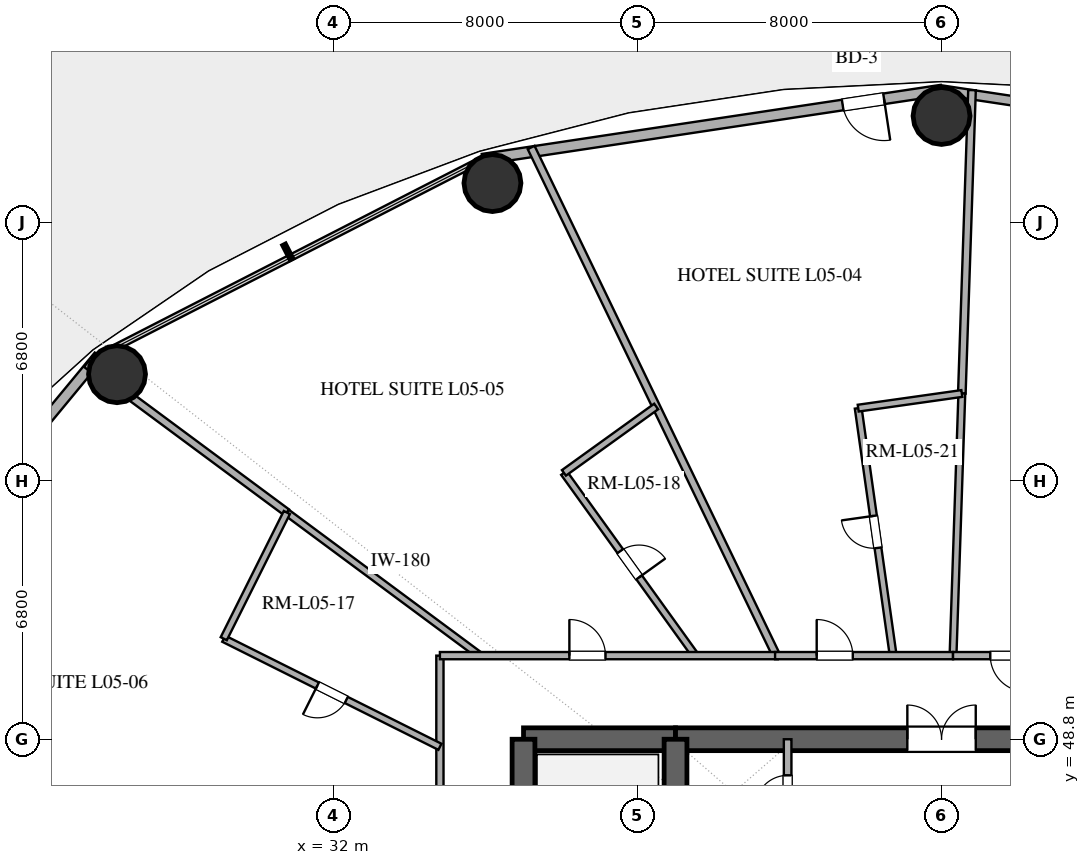
"""IFC4 building model, lengths in metres.
Left out: names, types, materials, properties, quantities, classifications, styles, units other than length and angle.
Written with IfcOpenShell. Run it as: python <this file> out.ifc"""

import sys

from ifc_helpers import new_model, si_unit, direction, frame, frame_2d, origin, origin_2d, place, context, subcontext, project, spatial, rectangle, hollow_circle, extrude, element, fill, save


model = new_model("IFC4")
c1 = context("Model", 3, precision=1e-05, world=origin(), true_north=direction((0.0, 1.0)))
c2 = subcontext(c1, "Body", "Model", "MODEL_VIEW")
j1 = project(units=[si_unit("LENGTHUNIT", "METRE"), si_unit("PLANEANGLEUNIT", "RADIAN")], contexts=[c1])
p1 = place(None, origin())
s1 = spatial("IfcSite", under=j1, at=p1, CompositionType="ELEMENT")
p2 = place(p1, origin())
s2 = spatial("IfcBuilding", under=s1, at=p2, CompositionType="ELEMENT")
p3 = place(p2, frame((0.0, 0.0, 28.2)))
s3 = spatial("IfcBuildingStorey", under=s2, at=p3, CompositionType="ELEMENT", Elevation=28.2)
p4 = place(p3, frame((37.0, 48.8, 0.0), z_axis=(0.0, 0.0, 1.0), x_axis=(1.0, 0.0, 0.0)))
e1 = element("IfcWall", 1, at=p4, inside=s3, PredefinedType="SHEAR", context=c2, shape_type="SweptSolid", body=[
    extrude(rectangle(XDim=4.0, YDim=0.6, at=frame_2d((2.0, 0.0))), origin(), (0.0, 0.0, 1.0), 3.38),
])
p5 = place(p3, frame((41.0, 48.8, 0.0), z_axis=(0.0, 0.0, 1.0), x_axis=(1.0, 0.0, 0.0)))
e2 = element("IfcWall", 2, at=p5, inside=s3, PredefinedType="SHEAR", context=c2, shape_type="SweptSolid", body=[
    extrude(rectangle(XDim=14.0, YDim=0.6, at=frame_2d((7.0, 0.0))), origin(), (0.0, 0.0, 1.0), 3.38),
])
p6 = place(p5, frame((6.1, 0.0, 0.0)))
e3 = element("IfcOpeningElement", 3, at=p6, cuts=e2, PredefinedType="OPENING", context=c2, shape_type="SweptSolid", body=[
    extrude(rectangle(XDim=1.8, YDim=2.25, at=frame_2d((0.9, 1.125))), frame((0.0, 0.31, 0.0), z_axis=(0.0, -1.0, 0.0), x_axis=(1.0, 0.0, 0.0)), (0.0, 0.0, 1.0), 0.62),
])
p7 = place(p3, frame((37.0, 35.2, 0.0), z_axis=(0.0, 0.0, 1.0), x_axis=(0.0, 1.0, 0.0)))
e4 = element("IfcWall", 4, at=p7, inside=s3, PredefinedType="SHEAR", context=c2, shape_type="SweptSolid", body=[
    extrude(rectangle(XDim=13.6, YDim=0.6, at=frame_2d((6.8, 0.0))), origin(), (0.0, 0.0, 1.0), 3.38),
])
p8 = place(p7, frame((1.5, 0.0, 0.0)))
e5 = element("IfcOpeningElement", 5, at=p8, cuts=e4, PredefinedType="OPENING", context=c2, shape_type="SweptSolid", body=[
    extrude(rectangle(XDim=1.2, YDim=2.15, at=frame_2d((0.6, 1.075))), frame((0.0, 0.31, 0.0), z_axis=(0.0, -1.0, 0.0), x_axis=(1.0, 0.0, 0.0)), (0.0, 0.0, 1.0), 0.62),
])
p9 = place(p3, frame((41.0, 35.2, 0.0), z_axis=(0.0, 0.0, 1.0), x_axis=(0.0, 1.0, 0.0)))
e6 = element("IfcWall", 6, at=p9, inside=s3, PredefinedType="SHEAR", context=c2, shape_type="SweptSolid", body=[
    extrude(rectangle(XDim=13.6, YDim=0.6, at=frame_2d((6.8, 0.0))), origin(), (0.0, 0.0, 1.0), 3.38),
])
p10 = place(p9, frame((1.15, 0.0, 0.0)))
e7 = element("IfcOpeningElement", 7, at=p10, cuts=e6, PredefinedType="OPENING", context=c2, shape_type="SweptSolid", body=[
    extrude(rectangle(XDim=1.1, YDim=2.2, at=frame_2d((0.55, 1.1))), frame((0.0, 0.31, 0.0), z_axis=(0.0, -1.0, 0.0), x_axis=(1.0, 0.0, 0.0)), (0.0, 0.0, 1.0), 0.62),
])
for number, where, z_axis, x_axis in (
    (8, (48.0, 65.2, 0.0), (0.0, 0.0, 1.0), (1.0, 0.0, 0.0)),
    (9, (36.182, 63.434, 0.0), (0.0, 0.0, 1.0), (1.0, 0.0, 0.0)),
    (10, (26.303, 58.405, 0.0), (0.0, 0.0, 1.0), (1.0, 0.0, 0.0)),
):
    element("IfcColumn", number, at=place(p3, frame(where, z_axis=z_axis, x_axis=x_axis)), inside=s3, PredefinedType="COLUMN", context=c2, shape_type="SweptSolid", body=[
        extrude(hollow_circle(Radius=0.75, WallThickness=0.04, at=origin_2d()), origin(), (0.0, 0.0, 1.0), 3.38),
    ])
p11 = place(p3, frame((60.078, 64.062, 0.0), z_axis=(0.0, 0.0, 1.0), x_axis=(-0.988864835849, 0.148816452121, 0.0)))
e11 = element("IfcWall", 11, at=p11, inside=s3, PredefinedType="SOLIDWALL", context=c2, shape_type="SweptSolid", body=[
    extrude(rectangle(XDim=12.214, YDim=0.25, at=frame_2d((6.107, 0.0))), origin(), (0.0, 0.0, 1.0), 3.38),
])
p12 = place(p11, frame((8.195, 0.0, 1.42)))
e12 = element("IfcOpeningElement", 12, at=p12, cuts=e11, PredefinedType="OPENING", context=c2, shape_type="SweptSolid", body=[
    extrude(rectangle(XDim=1.0, YDim=1.05, at=frame_2d((0.5, 0.525))), frame((0.0, 0.135, 0.0), z_axis=(0.0, -1.0, 0.0), x_axis=(1.0, 0.0, 0.0)), (0.0, 0.0, 1.0), 0.27),
])
p13 = place(p3, frame((48.0, 65.88, 0.0), z_axis=(0.0, 0.0, 1.0), x_axis=(-0.988864835849, -0.148816452121, 0.0)))
e13 = element("IfcWall", 13, at=p13, inside=s3, PredefinedType="SOLIDWALL", context=c2, shape_type="SweptSolid", body=[
    extrude(rectangle(XDim=12.214, YDim=0.28, at=frame_2d((6.107, 0.0))), origin(), (0.0, 0.0, 1.0), 3.38),
])
p14 = place(p13, frame((1.531, 0.0, 0.0)))
e14 = element("IfcOpeningElement", 14, at=p14, cuts=e13, PredefinedType="OPENING", context=c2, shape_type="SweptSolid", body=[
    extrude(rectangle(XDim=1.1, YDim=2.25, at=frame_2d((0.55, 1.125))), frame((0.0, 0.15, 0.0), z_axis=(0.0, -1.0, 0.0), x_axis=(1.0, 0.0, 0.0)), (0.0, 0.0, 1.0), 0.3),
])
p15 = place(p3, frame((25.826, 58.886, 0.0), z_axis=(0.0, 0.0, 1.0), x_axis=(-0.637296809613, -0.770618437657, 0.0)))
e15 = element("IfcWall", 15, at=p15, inside=s3, PredefinedType="SOLIDWALL", context=c2, shape_type="SweptSolid", body=[
    extrude(rectangle(XDim=10.053, YDim=0.28, at=frame_2d((5.027, 0.0))), origin(), (0.0, 0.0, 1.0), 3.38),
])
p16 = place(p15, frame((2.798, 0.0, 0.85)))
e16 = element("IfcOpeningElement", 16, at=p16, cuts=e15, PredefinedType="OPENING", context=c2, shape_type="SweptSolid", body=[
    extrude(rectangle(XDim=1.5, YDim=1.8, at=frame_2d((0.75, 0.9))), frame((0.0, 0.15, 0.0), z_axis=(0.0, -1.0, 0.0), x_axis=(1.0, 0.0, 0.0)), (0.0, 0.0, 1.0), 0.3),
])
p17 = place(p15, frame((5.63, 0.0, 0.85)))
e17 = element("IfcOpeningElement", 17, at=p17, cuts=e15, PredefinedType="OPENING", context=c2, shape_type="SweptSolid", body=[
    extrude(rectangle(XDim=1.5, YDim=1.8, at=frame_2d((0.75, 0.9))), frame((0.0, 0.15, 0.0), z_axis=(0.0, -1.0, 0.0), x_axis=(1.0, 0.0, 0.0)), (0.0, 0.0, 1.0), 0.3),
])
p18 = place(p3, frame((43.95, 46.2, 0.0), z_axis=(0.0, 0.0, 1.0), x_axis=(0.0, 1.0, 0.0)))
e18 = element("IfcWall", 18, at=p18, inside=s3, PredefinedType="SOLIDWALL", context=c2, shape_type="SweptSolid", body=[
    extrude(rectangle(XDim=2.6, YDim=0.2, at=frame_2d((1.3, 0.0))), origin(), (0.0, 0.0, 1.0), 2.74),
])
p19 = place(p18, frame((0.8, 0.0, 0.0)))
e19 = element("IfcOpeningElement", 19, at=p19, cuts=e18, PredefinedType="OPENING", context=c2, shape_type="SweptSolid", body=[
    extrude(rectangle(XDim=0.85, YDim=2.15, at=frame_2d((0.425, 1.075))), frame((0.0, 0.11, 0.0), z_axis=(0.0, -1.0, 0.0), x_axis=(1.0, 0.0, 0.0)), (0.0, 0.0, 1.0), 0.22),
])
p20 = place(p3, frame((48.802, 65.88, 0.0), z_axis=(0.0, 0.0, 1.0), x_axis=(-0.033562144005, -0.999436632553, 0.0)))
e20 = element("IfcWall", 20, at=p20, inside=s3, PredefinedType="PARTITIONING", context=c2, shape_type="SweptSolid", body=[
    extrude(rectangle(XDim=7.987, YDim=0.2, at=frame_2d((3.994, 0.0))), origin(), (0.0, 0.0, 1.0), 2.74),
])
p21 = place(p3, frame((43.655, 51.0, 0.0), z_axis=(0.0, 0.0, 1.0), x_axis=(-0.434738949034, 0.900556520266, 0.0)))
e21 = element("IfcWall", 21, at=p21, inside=s3, PredefinedType="PARTITIONING", context=c2, shape_type="SweptSolid", body=[
    extrude(rectangle(XDim=14.847, YDim=0.2, at=frame_2d((7.424, 0.0))), origin(), (0.0, 0.0, 1.0), 2.74),
])
p22 = place(p3, frame((48.534, 57.897, 0.0), z_axis=(0.0, 0.0, 1.0), x_axis=(-0.033537457551, -0.999437461246, 0.0)))
e22 = element("IfcWall", 22, at=p22, inside=s3, PredefinedType="PLUMBINGWALL", context=c2, shape_type="SweptSolid", body=[
    extrude(rectangle(XDim=6.901, YDim=0.18, at=frame_2d((3.451, 0.0))), origin(), (0.0, 0.0, 1.0), 2.74),
])
p23 = place(p3, frame((34.8, 33.0, 0.0), z_axis=(0.0, 0.0, 1.0), x_axis=(0.0, 1.0, 0.0)))
e23 = element("IfcWall", 23, at=p23, inside=s3, PredefinedType="PARTITIONING", context=c2, shape_type="SweptSolid", body=[
    extrude(rectangle(XDim=18.0, YDim=0.19, at=frame_2d((9.0, 0.0))), origin(), (0.0, 0.0, 1.0), 2.74),
])
p24 = place(p23, frame((7.274, 0.0, 0.0)))
e24 = element("IfcOpeningElement", 24, at=p24, cuts=e23, PredefinedType="OPENING", context=c2, shape_type="SweptSolid", body=[
    extrude(rectangle(XDim=1.0, YDim=2.2, at=frame_2d((0.5, 1.1))), frame((0.0, 0.105, 0.0), z_axis=(0.0, -1.0, 0.0), x_axis=(1.0, 0.0, 0.0)), (0.0, 0.0, 1.0), 0.21),
])
p25 = place(p23, frame((12.854, 0.0, 0.0)))
e25 = element("IfcOpeningElement", 25, at=p25, cuts=e23, PredefinedType="OPENING", context=c2, shape_type="SweptSolid", body=[
    extrude(rectangle(XDim=0.95, YDim=2.15, at=frame_2d((0.475, 1.075))), frame((0.0, 0.105, 0.0), z_axis=(0.0, -1.0, 0.0), x_axis=(1.0, 0.0, 0.0)), (0.0, 0.0, 1.0), 0.21),
])
p26 = place(p3, frame((46.728, 51.0, 0.0), z_axis=(0.0, 0.0, 1.0), x_axis=(-0.139991961821, 0.990152640064, 0.0)))
e26 = element("IfcWall", 26, at=p26, inside=s3, PredefinedType="PLUMBINGWALL", context=c2, shape_type="SweptSolid", body=[
    extrude(rectangle(XDim=6.576, YDim=0.18, at=frame_2d((3.288, 0.0))), origin(), (0.0, 0.0, 1.0), 2.74),
])
p27 = place(p26, frame((2.863, 0.0, 0.0)))
e27 = element("IfcOpeningElement", 27, at=p27, cuts=e26, PredefinedType="OPENING", context=c2, shape_type="SweptSolid", body=[
    extrude(rectangle(XDim=0.85, YDim=2.1, at=frame_2d((0.425, 1.05))), frame((0.0, 0.1, 0.0), z_axis=(0.0, -1.0, 0.0), x_axis=(1.0, 0.0, 0.0)), (0.0, 0.0, 1.0), 0.2),
])
p28 = place(p3, frame((25.496, 58.675, 0.0), z_axis=(0.0, 0.0, 1.0), x_axis=(0.803457728354, -0.595361804912, 0.0)))
e28 = element("IfcWall", 28, at=p28, inside=s3, PredefinedType="PARTITIONING", context=c2, shape_type="SweptSolid", body=[
    extrude(rectangle(XDim=6.566, YDim=0.2, at=frame_2d((3.283, 0.0))), origin(), (0.0, 0.0, 1.0), 2.74),
])
p29 = place(p3, frame((34.8, 48.601, 0.0), z_axis=(0.0, 0.0, 1.0), x_axis=(-0.894404156958, 0.447259660617, 0.0)))
e29 = element("IfcWall", 29, at=p29, inside=s3, PredefinedType="PLUMBINGWALL", context=c2, shape_type="SweptSolid", body=[
    extrude(rectangle(XDim=6.36, YDim=0.18, at=frame_2d((3.18, 0.0))), origin(), (0.0, 0.0, 1.0), 2.74),
])
p30 = place(p29, frame((2.755, 0.0, 0.0)))
e30 = element("IfcOpeningElement", 30, at=p30, cuts=e29, PredefinedType="OPENING", context=c2, shape_type="SweptSolid", body=[
    extrude(rectangle(XDim=0.85, YDim=2.1, at=frame_2d((0.425, 1.05))), frame((0.0, 0.1, 0.0), z_axis=(0.0, -1.0, 0.0), x_axis=(1.0, 0.0, 0.0)), (0.0, 0.0, 1.0), 0.2),
])
p31 = place(p3, frame((30.772, 54.766, 0.0), z_axis=(0.0, 0.0, 1.0), x_axis=(0.803451199128, -0.595370616187, 0.0)))
e31 = element("IfcWall", 31, at=p31, inside=s3, PredefinedType="PLUMBINGWALL", context=c2, shape_type="SweptSolid", body=[
    extrude(rectangle(XDim=6.325, YDim=0.18, at=frame_2d((3.163, 0.0))), origin(), (0.0, 0.0, 1.0), 2.74),
])
p32 = place(p3, frame((38.063, 55.809, 0.0), z_axis=(0.0, 0.0, 1.0), x_axis=(0.584084318507, -0.811692989297, 0.0)))
e32 = element("IfcWall", 32, at=p32, inside=s3, PredefinedType="PLUMBINGWALL", context=c2, shape_type="SweptSolid", body=[
    extrude(rectangle(XDim=5.924, YDim=0.18, at=frame_2d((2.962, 0.0))), origin(), (0.0, 0.0, 1.0), 2.74),
])
p33 = place(p32, frame((2.537, 0.0, 0.0)))
e33 = element("IfcOpeningElement", 33, at=p33, cuts=e32, PredefinedType="OPENING", context=c2, shape_type="SweptSolid", body=[
    extrude(rectangle(XDim=0.85, YDim=2.1, at=frame_2d((0.425, 1.05))), frame((0.0, 0.1, 0.0), z_axis=(0.0, -1.0, 0.0), x_axis=(1.0, 0.0, 0.0)), (0.0, 0.0, 1.0), 0.2),
])
p34 = place(p3, frame((34.8, 51.0, 0.0), z_axis=(0.0, 0.0, 1.0), x_axis=(1.0, 0.0, 0.0)))
e34 = element("IfcWall", 34, at=p34, inside=s3, PredefinedType="PARTITIONING", context=c2, shape_type="SweptSolid", body=[
    extrude(rectangle(XDim=8.891, YDim=0.19, at=frame_2d((4.445, 0.0))), origin(), (0.0, 0.0, 1.0), 2.74),
])
p35 = place(p34, frame((3.407, 0.0, 0.0)))
e35 = element("IfcOpeningElement", 35, at=p35, cuts=e34, PredefinedType="OPENING", context=c2, shape_type="SweptSolid", body=[
    extrude(rectangle(XDim=0.95, YDim=2.15, at=frame_2d((0.475, 1.075))), frame((0.0, 0.105, 0.0), z_axis=(0.0, -1.0, 0.0), x_axis=(1.0, 0.0, 0.0)), (0.0, 0.0, 1.0), 0.21),
])
p36 = place(p3, frame((29.112, 51.446, 0.0), z_axis=(0.0, 0.0, 1.0), x_axis=(0.447292516126, 0.894387726334, 0.0)))
e36 = element("IfcWall", 36, at=p36, inside=s3, PredefinedType="PLUMBINGWALL", context=c2, shape_type="SweptSolid", body=[
    extrude(rectangle(XDim=3.712, YDim=0.18, at=frame_2d((1.856, 0.0))), origin(), (0.0, 0.0, 1.0), 2.74),
])
p37 = place(p3, frame((43.62, 51.0, 0.0), z_axis=(0.0, 0.0, 1.0), x_axis=(1.0, 0.0, 0.0)))
e37 = element("IfcWall", 37, at=p37, inside=s3, PredefinedType="PARTITIONING", context=c2, shape_type="SweptSolid", body=[
    extrude(rectangle(XDim=4.683, YDim=0.19, at=frame_2d((2.341, 0.0))), origin(), (0.0, 0.0, 1.0), 2.74),
])
p38 = place(p37, frame((1.095, 0.0, 0.0)))
e38 = element("IfcOpeningElement", 38, at=p38, cuts=e37, PredefinedType="OPENING", context=c2, shape_type="SweptSolid", body=[
    extrude(rectangle(XDim=0.95, YDim=2.15, at=frame_2d((0.475, 1.075))), frame((0.0, 0.105, 0.0), z_axis=(0.0, -1.0, 0.0), x_axis=(1.0, 0.0, 0.0)), (0.0, 0.0, 1.0), 0.21),
])
p39 = place(p3, frame((40.49, 57.555, 0.0), z_axis=(0.0, 0.0, 1.0), x_axis=(-0.811670601443, -0.584115429305, 0.0)))
e39 = element("IfcWall", 39, at=p39, inside=s3, PredefinedType="PLUMBINGWALL", context=c2, shape_type="SweptSolid", body=[
    extrude(rectangle(XDim=2.99, YDim=0.18, at=frame_2d((1.495, 0.0))), origin(), (0.0, 0.0, 1.0), 2.74),
])
p40 = place(p3, frame((51.213, 51.0, 0.0), z_axis=(0.0, 0.0, 1.0), x_axis=(-1.0, 0.0, 0.0)))
e40 = element("IfcWall", 40, at=p40, inside=s3, PredefinedType="PARTITIONING", context=c2, shape_type="SweptSolid", body=[
    extrude(rectangle(XDim=2.911, YDim=0.19, at=frame_2d((1.455, 0.0))), origin(), (0.0, 0.0, 1.0), 2.74),
])
p41 = place(p40, frame((0.98, 0.0, 0.0)))
e41 = element("IfcOpeningElement", 41, at=p41, cuts=e40, PredefinedType="OPENING", context=c2, shape_type="SweptSolid", body=[
    extrude(rectangle(XDim=0.95, YDim=2.15, at=frame_2d((0.475, 1.075))), frame((0.0, 0.105, 0.0), z_axis=(0.0, -1.0, 0.0), x_axis=(1.0, 0.0, 0.0)), (0.0, 0.0, 1.0), 0.21),
])
p42 = place(p3, frame((45.807, 57.512, 0.0), z_axis=(0.0, 0.0, 1.0), x_axis=(0.990152382036, 0.139993786823, 0.0)))
e42 = element("IfcWall", 42, at=p42, inside=s3, PredefinedType="PLUMBINGWALL", context=c2, shape_type="SweptSolid", body=[
    extrude(rectangle(XDim=2.754, YDim=0.18, at=frame_2d((1.377, 0.0))), origin(), (0.0, 0.0, 1.0), 2.74),
])
p43 = place(p14, origin())
e43 = element("IfcDoor", 43, at=p43, inside=s3, OperationType="SINGLE_SWING_LEFT", PredefinedType="DOOR", context=c2, shape_type="SweptSolid", body=[
    extrude(rectangle(XDim=1.1, YDim=2.25, at=frame_2d((0.55, 1.125))), frame((0.0, 0.025, 0.0), z_axis=(0.0, -1.0, 0.0), x_axis=(1.0, 0.0, 0.0)), (0.0, 0.0, 1.0), 0.05),
])
fill(e14, e43)
p44 = place(p6, origin())
e44 = element("IfcDoor", 44, at=p44, inside=s3, OperationType="DOUBLE_DOOR_SINGLE_SWING", PredefinedType="DOOR", context=c2, shape_type="SweptSolid", body=[
    extrude(rectangle(XDim=1.8, YDim=2.25, at=frame_2d((0.9, 1.125))), frame((0.0, 0.025, 0.0), z_axis=(0.0, -1.0, 0.0), x_axis=(1.0, 0.0, 0.0)), (0.0, 0.0, 1.0), 0.05),
])
fill(e3, e44)
p45 = place(p19, origin())
e45 = element("IfcDoor", 45, at=p45, inside=s3, OperationType="SINGLE_SWING_LEFT", PredefinedType="DOOR", context=c2, shape_type="SweptSolid", body=[
    extrude(rectangle(XDim=0.85, YDim=2.15, at=frame_2d((0.425, 1.075))), frame((0.0, 0.025, 0.0), z_axis=(0.0, -1.0, 0.0), x_axis=(1.0, 0.0, 0.0)), (0.0, 0.0, 1.0), 0.05),
])
fill(e19, e45)
p46 = place(p27, origin())
e46 = element("IfcDoor", 46, at=p46, inside=s3, OperationType="SINGLE_SWING_RIGHT", PredefinedType="DOOR", context=c2, shape_type="SweptSolid", body=[
    extrude(rectangle(XDim=0.85, YDim=2.1, at=frame_2d((0.425, 1.05))), frame((0.0, 0.025, 0.0), z_axis=(0.0, -1.0, 0.0), x_axis=(1.0, 0.0, 0.0)), (0.0, 0.0, 1.0), 0.05),
])
fill(e27, e46)
p47 = place(p30, origin())
e47 = element("IfcDoor", 47, at=p47, inside=s3, OperationType="SINGLE_SWING_RIGHT", PredefinedType="DOOR", context=c2, shape_type="SweptSolid", body=[
    extrude(rectangle(XDim=0.85, YDim=2.1, at=frame_2d((0.425, 1.05))), frame((0.0, 0.025, 0.0), z_axis=(0.0, -1.0, 0.0), x_axis=(1.0, 0.0, 0.0)), (0.0, 0.0, 1.0), 0.05),
])
fill(e30, e47)
p48 = place(p33, origin())
e48 = element("IfcDoor", 48, at=p48, inside=s3, OperationType="SINGLE_SWING_RIGHT", PredefinedType="DOOR", context=c2, shape_type="SweptSolid", body=[
    extrude(rectangle(XDim=0.85, YDim=2.1, at=frame_2d((0.425, 1.05))), frame((0.0, 0.025, 0.0), z_axis=(0.0, -1.0, 0.0), x_axis=(1.0, 0.0, 0.0)), (0.0, 0.0, 1.0), 0.05),
])
fill(e33, e48)
p49 = place(p35, origin())
e49 = element("IfcDoor", 49, at=p49, inside=s3, OperationType="SINGLE_SWING_LEFT", PredefinedType="DOOR", context=c2, shape_type="SweptSolid", body=[
    extrude(rectangle(XDim=0.95, YDim=2.15, at=frame_2d((0.475, 1.075))), frame((0.0, 0.025, 0.0), z_axis=(0.0, -1.0, 0.0), x_axis=(1.0, 0.0, 0.0)), (0.0, 0.0, 1.0), 0.05),
])
fill(e35, e49)
p50 = place(p38, origin())
e50 = element("IfcDoor", 50, at=p50, inside=s3, OperationType="SINGLE_SWING_LEFT", PredefinedType="DOOR", context=c2, shape_type="SweptSolid", body=[
    extrude(rectangle(XDim=0.95, YDim=2.15, at=frame_2d((0.475, 1.075))), frame((0.0, 0.025, 0.0), z_axis=(0.0, -1.0, 0.0), x_axis=(1.0, 0.0, 0.0)), (0.0, 0.0, 1.0), 0.05),
])
fill(e38, e50)
p51 = place(p41, origin())
e51 = element("IfcDoor", 51, at=p51, inside=s3, OperationType="SINGLE_SWING_LEFT", PredefinedType="DOOR", context=c2, shape_type="SweptSolid", body=[
    extrude(rectangle(XDim=0.95, YDim=2.15, at=frame_2d((0.475, 1.075))), frame((0.0, 0.025, 0.0), z_axis=(0.0, -1.0, 0.0), x_axis=(1.0, 0.0, 0.0)), (0.0, 0.0, 1.0), 0.05),
])
fill(e41, e51)
save(model, sys.argv[1])
